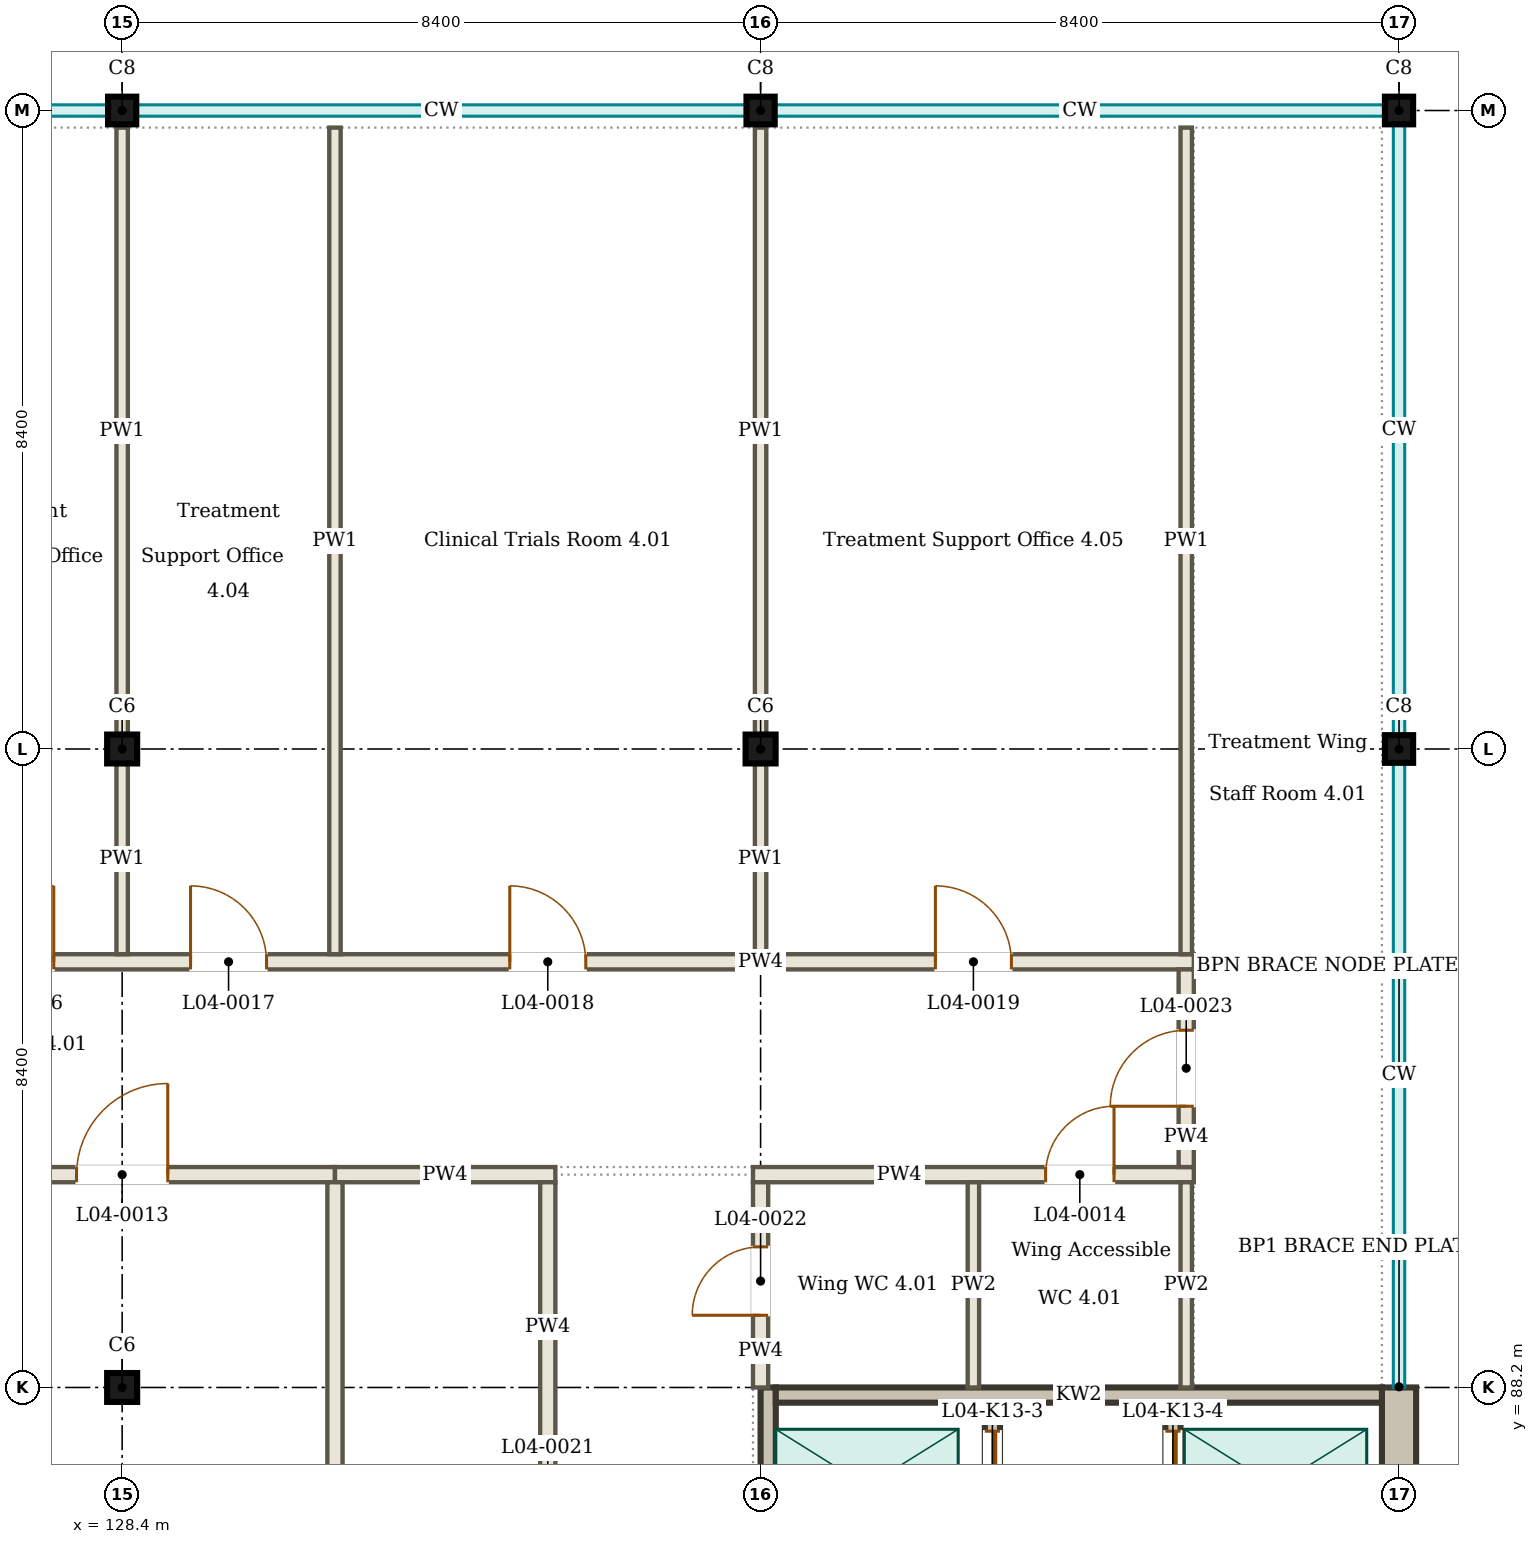
"""IFC4 building model, lengths in metres.
Left out: names, types, materials, properties, quantities, classifications, styles, units other than length and angle.
Written with IfcOpenShell. Run it as: python <this file> out.ifc"""

import sys

from ifc_helpers import new_model, si_unit, direction, frame, frame_2d, origin, origin_2d, place, context, subcontext, project, spatial, rectangle, i_section, extrude, element, fill, save


model = new_model("IFC4")
c1 = context("Model", 3, precision=1e-05, world=origin(), true_north=direction((0.0, 1.0)))
c2 = subcontext(c1, "Body", "Model", "MODEL_VIEW")
j1 = project(units=[si_unit("LENGTHUNIT", "METRE"), si_unit("PLANEANGLEUNIT", "RADIAN")], contexts=[c1])
p1 = place(None, origin())
s1 = spatial("IfcSite", under=j1, at=p1, CompositionType="ELEMENT")
p2 = place(p1, origin())
s2 = spatial("IfcBuilding", under=s1, at=p2, CompositionType="ELEMENT")
p3 = place(p2, frame((0.0, 0.0, 18.0)))
s3 = spatial("IfcBuildingStorey", under=s2, at=p3, CompositionType="ELEMENT", Elevation=18.0)
for number, where, z_axis, x_axis in (
    (1, (128.4, 88.2, 0.0), (0.0, 0.0, 1.0), (1.0, 0.0, 0.0)),
    (2, (128.4, 96.6, 0.0), (0.0, 0.0, 1.0), (1.0, 0.0, 0.0)),
    (3, (136.8, 96.6, 0.0), (0.0, 0.0, 1.0), (1.0, 0.0, 0.0)),
):
    element("IfcColumn", number, at=place(p3, frame(where, z_axis=z_axis, x_axis=x_axis)), inside=s3, PredefinedType="COLUMN", context=c2, shape_type="SweptSolid", body=[
        extrude(i_section(OverallWidth=0.395, OverallDepth=0.38, WebThickness=0.019, FlangeThickness=0.03, FilletRadius=0.027, at=origin_2d()), origin(), (0.0, 0.0, 1.0), 4.5),
    ])
for number, where, z_axis, x_axis in (
    (4, (145.2, 96.6, 0.0), (0.0, 0.0, 1.0), (1.0, 0.0, 0.0)),
    (5, (128.4, 105.0, 0.0), (0.0, 0.0, 1.0), (1.0, 0.0, 0.0)),
    (6, (136.8, 105.0, 0.0), (0.0, 0.0, 1.0), (1.0, 0.0, 0.0)),
    (7, (145.2, 105.0, 0.0), (0.0, 0.0, 1.0), (1.0, 0.0, 0.0)),
):
    element("IfcColumn", number, at=place(p3, frame(where, z_axis=z_axis, x_axis=x_axis)), inside=s3, PredefinedType="COLUMN", context=c2, shape_type="SweptSolid", body=[
        extrude(i_section(OverallWidth=0.371, OverallDepth=0.364, WebThickness=0.013, FlangeThickness=0.022, FilletRadius=0.027, at=origin_2d()), origin(), (0.0, 0.0, 1.0), 4.5),
    ])
p4 = place(p3, frame((136.8, 105.16, 3.82), z_axis=(0.0, 0.0, 1.0), x_axis=(1.0, 0.0, 0.0)))
e8 = element("IfcWall", 8, at=p4, inside=s3, PredefinedType="SOLIDWALL", context=c2, shape_type="SweptSolid", body=[
    extrude(rectangle(XDim=8.4, YDim=0.13, at=frame_2d((4.2, 0.0))), origin(), (0.0, 0.0, 1.0), 0.68),
])
p5 = place(p3, frame((111.825, 91.0, 0.0), z_axis=(0.0, 0.0, 1.0), x_axis=(1.0, 0.0, 0.0)))
e9 = element("IfcWall", 9, at=p5, inside=s3, PredefinedType="PARTITIONING", context=c2, shape_type="SweptSolid", body=[
    extrude(rectangle(XDim=19.375, YDim=0.2, at=frame_2d((9.688, 0.0))), origin(), (0.0, 0.0, 1.0), 3.75),
])
p6 = place(p5, frame((3.375, 0.0, 0.0)))
e10 = element("IfcOpeningElement", 10, at=p6, cuts=e9, PredefinedType="OPENING", context=c2, shape_type="SweptSolid", body=[
    extrude(rectangle(XDim=1.2, YDim=2.1, at=frame_2d((0.6, 1.05))), frame((0.0, 0.11, 0.0), z_axis=(0.0, -1.0, 0.0), x_axis=(1.0, 0.0, 0.0)), (0.0, 0.0, 1.0), 0.22),
])
p7 = place(p5, frame((10.375, 0.0, 0.0)))
e11 = element("IfcOpeningElement", 11, at=p7, cuts=e9, PredefinedType="OPENING", context=c2, shape_type="SweptSolid", body=[
    extrude(rectangle(XDim=1.2, YDim=2.1, at=frame_2d((0.6, 1.05))), frame((0.0, 0.11, 0.0), z_axis=(0.0, -1.0, 0.0), x_axis=(1.0, 0.0, 0.0)), (0.0, 0.0, 1.0), 0.22),
])
p8 = place(p5, frame((15.975, 0.0, 0.0)))
e12 = element("IfcOpeningElement", 12, at=p8, cuts=e9, PredefinedType="OPENING", context=c2, shape_type="SweptSolid", body=[
    extrude(rectangle(XDim=1.2, YDim=2.1, at=frame_2d((0.6, 1.05))), frame((0.0, 0.11, 0.0), z_axis=(0.0, -1.0, 0.0), x_axis=(1.0, 0.0, 0.0)), (0.0, 0.0, 1.0), 0.22),
])
p9 = place(p3, frame((131.2, 91.0, 0.0), z_axis=(0.0, 0.0, 1.0), x_axis=(1.0, 0.0, 0.0)))
e13 = element("IfcWall", 13, at=p9, inside=s3, PredefinedType="PARTITIONING", context=c2, shape_type="SweptSolid", body=[
    extrude(rectangle(XDim=2.9, YDim=0.2, at=frame_2d((1.45, 0.0))), origin(), (0.0, 0.0, 1.0), 3.894),
])
p10 = place(p3, frame((136.7, 91.0, 0.0), z_axis=(0.0, 0.0, 1.0), x_axis=(1.0, 0.0, 0.0)))
e14 = element("IfcWall", 14, at=p10, inside=s3, PredefinedType="PARTITIONING", context=c2, shape_type="SweptSolid", body=[
    extrude(rectangle(XDim=5.8, YDim=0.2, at=frame_2d((2.9, 0.0))), origin(), (0.0, 0.0, 1.0), 3.75),
])
p11 = place(p10, frame((3.85, 0.0, 0.0)))
e15 = element("IfcOpeningElement", 15, at=p11, cuts=e14, PredefinedType="OPENING", context=c2, shape_type="SweptSolid", body=[
    extrude(rectangle(XDim=0.9, YDim=2.1, at=frame_2d((0.45, 1.05))), frame((0.0, 0.11, 0.0), z_axis=(0.0, -1.0, 0.0), x_axis=(1.0, 0.0, 0.0)), (0.0, 0.0, 1.0), 0.22),
])
p12 = place(p3, frame((119.9, 93.8, 0.0), z_axis=(0.0, 0.0, 1.0), x_axis=(1.0, 0.0, 0.0)))
e16 = element("IfcWall", 16, at=p12, inside=s3, PredefinedType="PARTITIONING", context=c2, shape_type="SweptSolid", body=[
    extrude(rectangle(XDim=22.6, YDim=0.2, at=frame_2d((11.3, 0.0))), origin(), (0.0, 0.0, 1.0), 3.75),
])
p13 = place(p12, frame((2.4, 0.0, 0.0)))
e17 = element("IfcOpeningElement", 17, at=p13, cuts=e16, PredefinedType="OPENING", context=c2, shape_type="SweptSolid", body=[
    extrude(rectangle(XDim=1.0, YDim=2.1, at=frame_2d((0.5, 1.05))), frame((0.0, 0.11, 0.0), z_axis=(0.0, -1.0, 0.0), x_axis=(1.0, 0.0, 0.0)), (0.0, 0.0, 1.0), 0.22),
])
p14 = place(p12, frame((6.6, 0.0, 0.0)))
e18 = element("IfcOpeningElement", 18, at=p14, cuts=e16, PredefinedType="OPENING", context=c2, shape_type="SweptSolid", body=[
    extrude(rectangle(XDim=1.0, YDim=2.1, at=frame_2d((0.5, 1.05))), frame((0.0, 0.11, 0.0), z_axis=(0.0, -1.0, 0.0), x_axis=(1.0, 0.0, 0.0)), (0.0, 0.0, 1.0), 0.22),
])
p15 = place(p12, frame((9.4, 0.0, 0.0)))
e19 = element("IfcOpeningElement", 19, at=p15, cuts=e16, PredefinedType="OPENING", context=c2, shape_type="SweptSolid", body=[
    extrude(rectangle(XDim=1.0, YDim=2.1, at=frame_2d((0.5, 1.05))), frame((0.0, 0.11, 0.0), z_axis=(0.0, -1.0, 0.0), x_axis=(1.0, 0.0, 0.0)), (0.0, 0.0, 1.0), 0.22),
])
p16 = place(p12, frame((13.6, 0.0, 0.0)))
e20 = element("IfcOpeningElement", 20, at=p16, cuts=e16, PredefinedType="OPENING", context=c2, shape_type="SweptSolid", body=[
    extrude(rectangle(XDim=1.0, YDim=2.1, at=frame_2d((0.5, 1.05))), frame((0.0, 0.11, 0.0), z_axis=(0.0, -1.0, 0.0), x_axis=(1.0, 0.0, 0.0)), (0.0, 0.0, 1.0), 0.22),
])
p17 = place(p12, frame((19.2, 0.0, 0.0)))
e21 = element("IfcOpeningElement", 21, at=p17, cuts=e16, PredefinedType="OPENING", context=c2, shape_type="SweptSolid", body=[
    extrude(rectangle(XDim=1.0, YDim=2.1, at=frame_2d((0.5, 1.05))), frame((0.0, 0.11, 0.0), z_axis=(0.0, -1.0, 0.0), x_axis=(1.0, 0.0, 0.0)), (0.0, 0.0, 1.0), 0.22),
])
p18 = place(p3, frame((128.4, 93.9, 0.0), z_axis=(0.0, 0.0, 1.0), x_axis=(0.0, 1.0, 0.0)))
e22 = element("IfcWall", 22, at=p18, inside=s3, PredefinedType="PARTITIONING", context=c2, shape_type="SweptSolid", body=[
    extrude(rectangle(XDim=2.503, YDim=0.15, at=frame_2d((1.251, 0.0))), origin(), (0.0, 0.0, 1.0), 3.75),
])
p19 = place(p3, frame((128.4, 96.798, 0.0), z_axis=(0.0, 0.0, 1.0), x_axis=(0.0, 1.0, 0.0)))
e23 = element("IfcWall", 23, at=p19, inside=s3, PredefinedType="PARTITIONING", context=c2, shape_type="SweptSolid", body=[
    extrude(rectangle(XDim=7.977, YDim=0.15, at=frame_2d((3.989, 0.0))), origin(), (0.0, 0.0, 1.0), 3.75),
])
p20 = place(p3, frame((131.2, 80.025, 0.0), z_axis=(0.0, 0.0, 1.0), x_axis=(0.0, 1.0, 0.0)))
e24 = element("IfcWall", 24, at=p20, inside=s3, PredefinedType="PARTITIONING", context=c2, shape_type="SweptSolid", body=[
    extrude(rectangle(XDim=10.875, YDim=0.2, at=frame_2d((5.438, 0.0))), origin(), (0.0, 0.0, 1.0), 3.75),
])
p21 = place(p3, frame((131.2, 93.9, 0.0), z_axis=(0.0, 0.0, 1.0), x_axis=(0.0, 1.0, 0.0)))
e25 = element("IfcWall", 25, at=p21, inside=s3, PredefinedType="PARTITIONING", context=c2, shape_type="SweptSolid", body=[
    extrude(rectangle(XDim=10.875, YDim=0.15, at=frame_2d((5.438, 0.0))), origin(), (0.0, 0.0, 1.0), 3.75),
])
p22 = place(p3, frame((134.0, 82.3, 0.0), z_axis=(0.0, 0.0, 1.0), x_axis=(0.0, 1.0, 0.0)))
e26 = element("IfcWall", 26, at=p22, inside=s3, PredefinedType="PARTITIONING", context=c2, shape_type="SweptSolid", body=[
    extrude(rectangle(XDim=8.6, YDim=0.2, at=frame_2d((4.3, 0.0))), origin(), (0.0, 0.0, 1.0), 3.75),
])
p23 = place(p22, frame((3.8, 0.0, 0.0)))
e27 = element("IfcOpeningElement", 27, at=p23, cuts=e26, PredefinedType="OPENING", context=c2, shape_type="SweptSolid", body=[
    extrude(rectangle(XDim=1.0, YDim=2.1, at=frame_2d((0.5, 1.05))), frame((0.0, 0.11, 0.0), z_axis=(0.0, -1.0, 0.0), x_axis=(1.0, 0.0, 0.0)), (0.0, 0.0, 1.0), 0.22),
])
p24 = place(p3, frame((136.8, 88.2, 0.0), z_axis=(0.0, 0.0, 1.0), x_axis=(0.0, 1.0, 0.0)))
e28 = element("IfcWall", 28, at=p24, inside=s3, PredefinedType="PARTITIONING", context=c2, shape_type="SweptSolid", body=[
    extrude(rectangle(XDim=2.7, YDim=0.2, at=frame_2d((1.35, 0.0))), origin(), (0.0, 0.0, 1.0), 3.75),
])
p25 = place(p24, frame((0.95, 0.0, 0.0)))
e29 = element("IfcOpeningElement", 29, at=p25, cuts=e28, PredefinedType="OPENING", context=c2, shape_type="SweptSolid", body=[
    extrude(rectangle(XDim=0.9, YDim=2.1, at=frame_2d((0.45, 1.05))), frame((0.0, 0.11, 0.0), z_axis=(0.0, -1.0, 0.0), x_axis=(1.0, 0.0, 0.0)), (0.0, 0.0, 1.0), 0.22),
])
p26 = place(p3, frame((136.8, 93.9, 0.0), z_axis=(0.0, 0.0, 1.0), x_axis=(0.0, 1.0, 0.0)))
e30 = element("IfcWall", 30, at=p26, inside=s3, PredefinedType="PARTITIONING", context=c2, shape_type="SweptSolid", body=[
    extrude(rectangle(XDim=2.503, YDim=0.15, at=frame_2d((1.251, 0.0))), origin(), (0.0, 0.0, 1.0), 3.75),
])
p27 = place(p3, frame((136.8, 96.798, 0.0), z_axis=(0.0, 0.0, 1.0), x_axis=(0.0, 1.0, 0.0)))
e31 = element("IfcWall", 31, at=p27, inside=s3, PredefinedType="PARTITIONING", context=c2, shape_type="SweptSolid", body=[
    extrude(rectangle(XDim=7.977, YDim=0.15, at=frame_2d((3.989, 0.0))), origin(), (0.0, 0.0, 1.0), 3.75),
])
for number, where, z_axis, x_axis in (
    (32, (139.6, 88.2, 0.0), (0.0, 0.0, 1.0), (0.0, 1.0, 0.0)),
    (33, (142.4, 88.2, 0.0), (0.0, 0.0, 1.0), (0.0, 1.0, 0.0)),
):
    element("IfcWall", number, at=place(p3, frame(where, z_axis=z_axis, x_axis=x_axis)), inside=s3, PredefinedType="PARTITIONING", context=c2, shape_type="SweptSolid", body=[
        extrude(rectangle(XDim=2.7, YDim=0.15, at=frame_2d((1.35, 0.0))), origin(), (0.0, 0.0, 1.0), 3.894),
    ])
p28 = place(p3, frame((142.4, 91.1, 0.0), z_axis=(0.0, 0.0, 1.0), x_axis=(0.0, 1.0, 0.0)))
e34 = element("IfcWall", 34, at=p28, inside=s3, PredefinedType="PARTITIONING", context=c2, shape_type="SweptSolid", body=[
    extrude(rectangle(XDim=2.6, YDim=0.2, at=frame_2d((1.3, 0.0))), origin(), (0.0, 0.0, 1.0), 3.894),
])
p29 = place(p28, frame((0.8, 0.0, 0.0)))
e35 = element("IfcOpeningElement", 35, at=p29, cuts=e34, PredefinedType="OPENING", context=c2, shape_type="SweptSolid", body=[
    extrude(rectangle(XDim=1.0, YDim=2.1, at=frame_2d((0.5, 1.05))), frame((0.0, 0.11, 0.0), z_axis=(0.0, -1.0, 0.0), x_axis=(1.0, 0.0, 0.0)), (0.0, 0.0, 1.0), 0.22),
])
p30 = place(p3, frame((142.4, 93.9, 0.0), z_axis=(0.0, 0.0, 1.0), x_axis=(0.0, 1.0, 0.0)))
e36 = element("IfcWall", 36, at=p30, inside=s3, PredefinedType="PARTITIONING", context=c2, shape_type="SweptSolid", body=[
    extrude(rectangle(XDim=10.875, YDim=0.15, at=frame_2d((5.438, 0.0))), origin(), (0.0, 0.0, 1.0), 3.75),
])
p31 = place(p3, frame((136.9, 79.8, 0.0), z_axis=(0.0, 0.0, 1.0), x_axis=(0.0, 1.0, 0.0)))
e37 = element("IfcWall", 37, at=p31, inside=s3, PredefinedType="SOLIDWALL", context=c2, shape_type="SweptSolid", body=[
    extrude(rectangle(XDim=8.4, YDim=0.2, at=frame_2d((4.2, 0.0))), origin(), (0.0, 0.0, 1.0), 4.5),
])
p32 = place(p31, frame((4.725, 0.0, 0.0)))
e38 = element("IfcOpeningElement", 38, at=p32, cuts=e37, PredefinedType="OPENING", context=c2, shape_type="SweptSolid", body=[
    extrude(rectangle(XDim=1.3, YDim=2.1, at=frame_2d((0.65, 1.05))), frame((0.0, 0.11, 0.0), z_axis=(0.0, -1.0, 0.0), x_axis=(1.0, 0.0, 0.0)), (0.0, 0.0, 1.0), 0.22),
])
p33 = place(p3, frame((145.2, 79.8, 0.0), z_axis=(0.0, 0.0, 1.0), x_axis=(0.0, 1.0, 0.0)))
e39 = element("IfcWall", 39, at=p33, inside=s3, PredefinedType="SOLIDWALL", context=c2, shape_type="SweptSolid", body=[
    extrude(rectangle(XDim=8.4, YDim=0.45, at=frame_2d((4.2, 0.0))), origin(), (0.0, 0.0, 1.0), 4.5),
])
p34 = place(p3, frame((137.0, 88.1, 0.0), z_axis=(0.0, 0.0, 1.0), x_axis=(1.0, 0.0, 0.0)))
e40 = element("IfcWall", 40, at=p34, inside=s3, PredefinedType="SOLIDWALL", context=c2, shape_type="SweptSolid", body=[
    extrude(rectangle(XDim=7.975, YDim=0.2, at=frame_2d((3.988, 0.0))), origin(), (0.0, 0.0, 1.0), 4.5),
])
p35 = place(p3, frame((139.85, 86.15, 0.0), z_axis=(0.0, 0.0, 1.0), x_axis=(0.0, 1.0, 0.0)))
e41 = element("IfcWall", 41, at=p35, inside=s3, PredefinedType="SOLIDWALL", context=c2, shape_type="SweptSolid", body=[
    extrude(rectangle(XDim=1.85, YDim=0.2, at=frame_2d((0.925, 0.0))), origin(), (0.0, 0.0, 1.0), 4.5),
])
p36 = place(p35, frame((0.375, 0.0, 0.0)))
e42 = element("IfcOpeningElement", 42, at=p36, cuts=e41, PredefinedType="OPENING", context=c2, shape_type="SweptSolid", body=[
    extrude(rectangle(XDim=1.1, YDim=2.1, at=frame_2d((0.55, 1.05))), frame((0.0, 0.11, 0.0), z_axis=(0.0, -1.0, 0.0), x_axis=(1.0, 0.0, 0.0)), (0.0, 0.0, 1.0), 0.22),
])
p37 = place(p3, frame((142.225, 86.15, 0.0), z_axis=(0.0, 0.0, 1.0), x_axis=(0.0, 1.0, 0.0)))
e43 = element("IfcWall", 43, at=p37, inside=s3, PredefinedType="SOLIDWALL", context=c2, shape_type="SweptSolid", body=[
    extrude(rectangle(XDim=1.85, YDim=0.2, at=frame_2d((0.925, 0.0))), origin(), (0.0, 0.0, 1.0), 4.5),
])
p38 = place(p37, frame((0.375, 0.0, 0.0)))
e44 = element("IfcOpeningElement", 44, at=p38, cuts=e43, PredefinedType="OPENING", context=c2, shape_type="SweptSolid", body=[
    extrude(rectangle(XDim=1.1, YDim=2.1, at=frame_2d((0.55, 1.05))), frame((0.0, 0.11, 0.0), z_axis=(0.0, -1.0, 0.0), x_axis=(1.0, 0.0, 0.0)), (0.0, 0.0, 1.0), 0.22),
])
p39 = place(p8, origin())
e45 = element("IfcDoor", 45, at=p39, inside=s3, OperationType="SINGLE_SWING_RIGHT", PredefinedType="DOOR", context=c2, shape_type="SweptSolid", body=[
    extrude(rectangle(XDim=1.2, YDim=2.1, at=frame_2d((0.6, 1.05))), frame((0.0, 0.025, 0.0), z_axis=(0.0, -1.0, 0.0), x_axis=(1.0, 0.0, 0.0)), (0.0, 0.0, 1.0), 0.05),
])
fill(e12, e45)
p40 = place(p11, origin())
e46 = element("IfcDoor", 46, at=p40, inside=s3, OperationType="SINGLE_SWING_RIGHT", PredefinedType="DOOR", context=c2, shape_type="SweptSolid", body=[
    extrude(rectangle(XDim=0.9, YDim=2.1, at=frame_2d((0.45, 1.05))), frame((0.0, 0.025, 0.0), z_axis=(0.0, -1.0, 0.0), x_axis=(1.0, 0.0, 0.0)), (0.0, 0.0, 1.0), 0.05),
])
fill(e15, e46)
p41 = place(p14, origin())
e47 = element("IfcDoor", 47, at=p41, inside=s3, OperationType="SINGLE_SWING_RIGHT", PredefinedType="DOOR", context=c2, shape_type="SweptSolid", body=[
    extrude(rectangle(XDim=1.0, YDim=2.1, at=frame_2d((0.5, 1.05))), frame((0.0, 0.025, 0.0), z_axis=(0.0, -1.0, 0.0), x_axis=(1.0, 0.0, 0.0)), (0.0, 0.0, 1.0), 0.05),
])
fill(e18, e47)
p42 = place(p15, origin())
e48 = element("IfcDoor", 48, at=p42, inside=s3, OperationType="SINGLE_SWING_LEFT", PredefinedType="DOOR", context=c2, shape_type="SweptSolid", body=[
    extrude(rectangle(XDim=1.0, YDim=2.1, at=frame_2d((0.5, 1.05))), frame((0.0, 0.025, 0.0), z_axis=(0.0, -1.0, 0.0), x_axis=(1.0, 0.0, 0.0)), (0.0, 0.0, 1.0), 0.05),
])
fill(e19, e48)
p43 = place(p16, origin())
e49 = element("IfcDoor", 49, at=p43, inside=s3, OperationType="SINGLE_SWING_LEFT", PredefinedType="DOOR", context=c2, shape_type="SweptSolid", body=[
    extrude(rectangle(XDim=1.0, YDim=2.1, at=frame_2d((0.5, 1.05))), frame((0.0, 0.025, 0.0), z_axis=(0.0, -1.0, 0.0), x_axis=(1.0, 0.0, 0.0)), (0.0, 0.0, 1.0), 0.05),
])
fill(e20, e49)
p44 = place(p17, origin())
e50 = element("IfcDoor", 50, at=p44, inside=s3, OperationType="SINGLE_SWING_LEFT", PredefinedType="DOOR", context=c2, shape_type="SweptSolid", body=[
    extrude(rectangle(XDim=1.0, YDim=2.1, at=frame_2d((0.5, 1.05))), frame((0.0, 0.025, 0.0), z_axis=(0.0, -1.0, 0.0), x_axis=(1.0, 0.0, 0.0)), (0.0, 0.0, 1.0), 0.05),
])
fill(e21, e50)
p45 = place(p25, origin())
e51 = element("IfcDoor", 51, at=p45, inside=s3, OperationType="SINGLE_SWING_LEFT", PredefinedType="DOOR", context=c2, shape_type="SweptSolid", body=[
    extrude(rectangle(XDim=0.9, YDim=2.1, at=frame_2d((0.45, 1.05))), frame((0.0, 0.025, 0.0), z_axis=(0.0, -1.0, 0.0), x_axis=(1.0, 0.0, 0.0)), (0.0, 0.0, 1.0), 0.05),
])
fill(e29, e51)
p46 = place(p29, origin())
e52 = element("IfcDoor", 52, at=p46, inside=s3, OperationType="SINGLE_SWING_LEFT", PredefinedType="DOOR", context=c2, shape_type="SweptSolid", body=[
    extrude(rectangle(XDim=1.0, YDim=2.1, at=frame_2d((0.5, 1.05))), frame((0.0, 0.025, 0.0), z_axis=(0.0, -1.0, 0.0), x_axis=(1.0, 0.0, 0.0)), (0.0, 0.0, 1.0), 0.05),
])
fill(e35, e52)
p47 = place(p36, origin())
e53 = element("IfcDoor", 53, at=p47, inside=s3, OperationType="DOUBLE_DOOR_SLIDING", PredefinedType="DOOR", context=c2, shape_type="SweptSolid", body=[
    extrude(rectangle(XDim=1.1, YDim=2.1, at=frame_2d((0.55, 1.05))), frame((0.0, 0.025, 0.0), z_axis=(0.0, -1.0, 0.0), x_axis=(1.0, 0.0, 0.0)), (0.0, 0.0, 1.0), 0.05),
])
fill(e42, e53)
p48 = place(p38, origin())
e54 = element("IfcDoor", 54, at=p48, inside=s3, OperationType="DOUBLE_DOOR_SLIDING", PredefinedType="DOOR", context=c2, shape_type="SweptSolid", body=[
    extrude(rectangle(XDim=1.1, YDim=2.1, at=frame_2d((0.55, 1.05))), frame((0.0, 0.025, 0.0), z_axis=(0.0, -1.0, 0.0), x_axis=(1.0, 0.0, 0.0)), (0.0, 0.0, 1.0), 0.05),
])
fill(e44, e54)
save(model, sys.argv[1])
